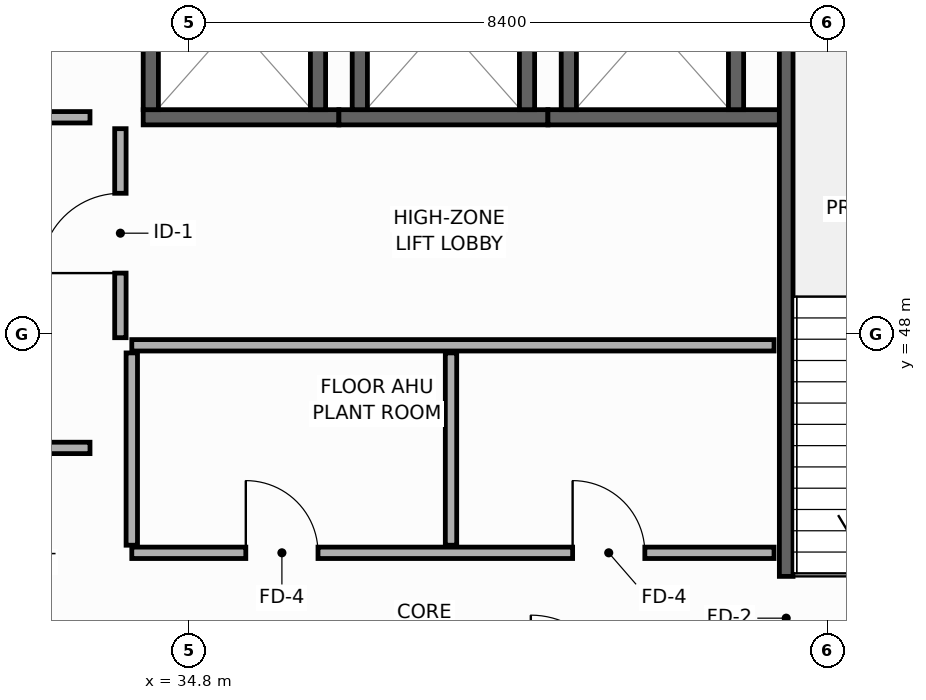
"""IFC4 building model, lengths in metres.
Left out: names, types, materials, properties, quantities, classifications, styles, units other than length and angle.
Written with IfcOpenShell. Run it as: python <this file> out.ifc"""

import sys

from ifc_helpers import new_model, si_unit, direction, frame, frame_2d, origin, place, context, subcontext, project, spatial, rectangle, extrude, element, fill, save


model = new_model("IFC4")
c1 = context("Model", 3, precision=1e-05, world=origin(), true_north=direction((0.0, 1.0)))
c2 = subcontext(c1, "Body", "Model", "MODEL_VIEW")
j1 = project(units=[si_unit("LENGTHUNIT", "METRE"), si_unit("PLANEANGLEUNIT", "RADIAN")], contexts=[c1])
p1 = place(None, origin())
s1 = spatial("IfcSite", under=j1, at=p1, CompositionType="ELEMENT")
p2 = place(p1, origin())
s2 = spatial("IfcBuilding", under=s1, at=p2, CompositionType="ELEMENT")
p3 = place(p2, frame((0.0, 0.0, 314.2)))
s3 = spatial("IfcBuildingStorey", under=s2, at=p3, CompositionType="ELEMENT", Elevation=314.2)
p4 = place(p3, frame((34.2, 50.85, 0.0), z_axis=(0.0, 0.0, 1.0), x_axis=(1.0, 0.0, 0.0)))
e1 = element("IfcWall", 1, at=p4, inside=s3, PredefinedType="SHEAR", context=c2, shape_type="SweptSolid", body=[
    extrude(rectangle(XDim=2.575, YDim=0.2, at=frame_2d((1.288, 0.0))), origin(), (0.0, 0.0, 1.0), 4.75),
])
for number, where, z_axis, x_axis in (
    (2, (34.3, 50.95, 0.0), (0.0, 0.0, 1.0), (0.0, 1.0, 0.0)),
    (3, (36.5, 50.95, 0.0), (0.0, 0.0, 1.0), (0.0, 1.0, 0.0)),
):
    element("IfcWall", number, at=place(p3, frame(where, z_axis=z_axis, x_axis=x_axis)), inside=s3, PredefinedType="SHEAR", context=c2, shape_type="SweptSolid", body=[
        extrude(rectangle(XDim=2.3, YDim=0.2, at=frame_2d((1.15, 0.0))), origin(), (0.0, 0.0, 1.0), 4.75),
    ])
p5 = place(p3, frame((36.775, 50.85, 0.0), z_axis=(0.0, 0.0, 1.0), x_axis=(1.0, 0.0, 0.0)))
e4 = element("IfcWall", 4, at=p5, inside=s3, PredefinedType="SHEAR", context=c2, shape_type="SweptSolid", body=[
    extrude(rectangle(XDim=2.75, YDim=0.2, at=frame_2d((1.375, 0.0))), origin(), (0.0, 0.0, 1.0), 4.75),
])
for number, where, z_axis, x_axis in (
    (5, (37.05, 50.95, 0.0), (0.0, 0.0, 1.0), (0.0, 1.0, 0.0)),
    (6, (39.25, 50.95, 0.0), (0.0, 0.0, 1.0), (0.0, 1.0, 0.0)),
):
    element("IfcWall", number, at=place(p3, frame(where, z_axis=z_axis, x_axis=x_axis)), inside=s3, PredefinedType="SHEAR", context=c2, shape_type="SweptSolid", body=[
        extrude(rectangle(XDim=2.3, YDim=0.2, at=frame_2d((1.15, 0.0))), origin(), (0.0, 0.0, 1.0), 4.75),
    ])
p6 = place(p3, frame((39.525, 50.85, 0.0), z_axis=(0.0, 0.0, 1.0), x_axis=(1.0, 0.0, 0.0)))
e7 = element("IfcWall", 7, at=p6, inside=s3, PredefinedType="SHEAR", context=c2, shape_type="SweptSolid", body=[
    extrude(rectangle(XDim=3.045, YDim=0.2, at=frame_2d((1.522, 0.0))), origin(), (0.0, 0.0, 1.0), 4.75),
])
for number, where, z_axis, x_axis in (
    (8, (39.8, 50.95, 0.0), (0.0, 0.0, 1.0), (0.0, 1.0, 0.0)),
    (9, (42.0, 50.95, 0.0), (0.0, 0.0, 1.0), (0.0, 1.0, 0.0)),
):
    element("IfcWall", number, at=place(p3, frame(where, z_axis=z_axis, x_axis=x_axis)), inside=s3, PredefinedType="SHEAR", context=c2, shape_type="SweptSolid", body=[
        extrude(rectangle(XDim=2.3, YDim=0.2, at=frame_2d((1.15, 0.0))), origin(), (0.0, 0.0, 1.0), 4.75),
    ])
p7 = place(p3, frame((42.66, 53.8, 0.0), z_axis=(0.0, 0.0, 1.0), x_axis=(0.0, -1.0, 0.0)))
e10 = element("IfcWall", 10, at=p7, inside=s3, PredefinedType="SHEAR", context=c2, shape_type="SweptSolid", body=[
    extrude(rectangle(XDim=10.4, YDim=0.18, at=frame_2d((5.2, 0.0))), origin(), (0.0, 0.0, 1.0), 4.75),
])
p8 = place(p7, frame((8.99, 0.0, 0.0)))
e11 = element("IfcOpeningElement", 11, at=p8, cuts=e10, PredefinedType="OPENING", context=c2, shape_type="SweptSolid", body=[
    extrude(rectangle(XDim=1.1, YDim=2.15, at=frame_2d((0.55, 1.075))), frame((0.0, 0.1, 0.0), z_axis=(0.0, -1.0, 0.0), x_axis=(1.0, 0.0, 0.0)), (0.0, 0.0, 1.0), 0.2),
])
p9 = place(p3, frame((33.9, 47.95, 0.0), z_axis=(0.0, 0.0, 1.0), x_axis=(0.0, 1.0, 0.0)))
e12 = element("IfcWall", 12, at=p9, inside=s3, PredefinedType="PARTITIONING", context=c2, shape_type="SweptSolid", body=[
    extrude(rectangle(XDim=2.75, YDim=0.15, at=frame_2d((1.375, 0.0))), origin(), (0.0, 0.0, 1.0), 4.75),
])
p10 = place(p9, frame((0.85, 0.0, 0.0)))
e13 = element("IfcOpeningElement", 13, at=p10, cuts=e12, PredefinedType="OPENING", context=c2, shape_type="SweptSolid", body=[
    extrude(rectangle(XDim=1.05, YDim=2.15, at=frame_2d((0.525, 1.075))), frame((0.0, 0.085, 0.0), z_axis=(0.0, -1.0, 0.0), x_axis=(1.0, 0.0, 0.0)), (0.0, 0.0, 1.0), 0.17),
])
p11 = place(p3, frame((34.05, 45.12, 0.0), z_axis=(0.0, 0.0, 1.0), x_axis=(1.0, 0.0, 0.0)))
e14 = element("IfcWall", 14, at=p11, inside=s3, PredefinedType="PARTITIONING", context=c2, shape_type="SweptSolid", body=[
    extrude(rectangle(XDim=8.45, YDim=0.15, at=frame_2d((4.225, 0.0))), origin(), (0.0, 0.0, 1.0), 4.75),
])
p12 = place(p11, frame((1.5, 0.0, 0.0)))
e15 = element("IfcOpeningElement", 15, at=p12, cuts=e14, PredefinedType="OPENING", context=c2, shape_type="SweptSolid", body=[
    extrude(rectangle(XDim=0.95, YDim=2.15, at=frame_2d((0.475, 1.075))), frame((0.0, 0.085, 0.0), z_axis=(0.0, -1.0, 0.0), x_axis=(1.0, 0.0, 0.0)), (0.0, 0.0, 1.0), 0.17),
])
p13 = place(p11, frame((5.8, 0.0, 0.0)))
e16 = element("IfcOpeningElement", 16, at=p13, cuts=e14, PredefinedType="OPENING", context=c2, shape_type="SweptSolid", body=[
    extrude(rectangle(XDim=0.95, YDim=2.15, at=frame_2d((0.475, 1.075))), frame((0.0, 0.085, 0.0), z_axis=(0.0, -1.0, 0.0), x_axis=(1.0, 0.0, 0.0)), (0.0, 0.0, 1.0), 0.17),
])
p14 = place(p3, frame((34.05, 47.85, 0.0), z_axis=(0.0, 0.0, 1.0), x_axis=(1.0, 0.0, 0.0)))
e17 = element("IfcWall", 17, at=p14, inside=s3, PredefinedType="PARTITIONING", context=c2, shape_type="SweptSolid", body=[
    extrude(rectangle(XDim=8.45, YDim=0.15, at=frame_2d((4.225, 0.0))), origin(), (0.0, 0.0, 1.0), 4.75),
])
for number, where, z_axis, x_axis in (
    (18, (38.25, 45.22, 0.0), (0.0, 0.0, 1.0), (0.0, 1.0, 0.0)),
    (19, (34.05, 45.22, 0.0), (0.0, 0.0, 1.0), (0.0, 1.0, 0.0)),
):
    element("IfcWall", number, at=place(p3, frame(where, z_axis=z_axis, x_axis=x_axis)), inside=s3, PredefinedType="PARTITIONING", context=c2, shape_type="SweptSolid", body=[
        extrude(rectangle(XDim=2.53, YDim=0.15, at=frame_2d((1.265, 0.0))), origin(), (0.0, 0.0, 1.0), 4.75),
    ])
p15 = place(p3, frame((25.85, 50.85, 0.0), z_axis=(0.0, 0.0, 1.0), x_axis=(1.0, 0.0, 0.0)))
e20 = element("IfcWall", 20, at=p15, inside=s3, PredefinedType="PARTITIONING", context=c2, shape_type="SweptSolid", body=[
    extrude(rectangle(XDim=7.65, YDim=0.15, at=frame_2d((3.825, 0.0))), origin(), (0.0, 0.0, 1.0), 4.75),
])
p16 = place(p15, frame((1.25, 0.0, 0.0)))
e21 = element("IfcOpeningElement", 21, at=p16, cuts=e20, PredefinedType="OPENING", context=c2, shape_type="SweptSolid", body=[
    extrude(rectangle(XDim=0.95, YDim=2.15, at=frame_2d((0.475, 1.075))), frame((0.0, 0.085, 0.0), z_axis=(0.0, -1.0, 0.0), x_axis=(1.0, 0.0, 0.0)), (0.0, 0.0, 1.0), 0.17),
])
p17 = place(p3, frame((25.85, 46.5, 0.0), z_axis=(0.0, 0.0, 1.0), x_axis=(1.0, 0.0, 0.0)))
e22 = element("IfcWall", 22, at=p17, inside=s3, PredefinedType="PARTITIONING", context=c2, shape_type="SweptSolid", body=[
    extrude(rectangle(XDim=7.65, YDim=0.15, at=frame_2d((3.825, 0.0))), origin(), (0.0, 0.0, 1.0), 4.75),
])
p18 = place(p17, frame((2.8, 0.0, 0.0)))
e23 = element("IfcOpeningElement", 23, at=p18, cuts=e22, PredefinedType="OPENING", context=c2, shape_type="SweptSolid", body=[
    extrude(rectangle(XDim=0.95, YDim=2.15, at=frame_2d((0.475, 1.075))), frame((0.0, 0.085, 0.0), z_axis=(0.0, -1.0, 0.0), x_axis=(1.0, 0.0, 0.0)), (0.0, 0.0, 1.0), 0.17),
])
p19 = place(p8, origin())
e24 = element("IfcDoor", 24, at=p19, inside=s3, OperationType="SINGLE_SWING_LEFT", PredefinedType="DOOR", context=c2, shape_type="SweptSolid", body=[
    extrude(rectangle(XDim=1.1, YDim=2.15, at=frame_2d((0.55, 1.075))), frame((0.0, 0.025, 0.0), z_axis=(0.0, -1.0, 0.0), x_axis=(1.0, 0.0, 0.0)), (0.0, 0.0, 1.0), 0.05),
])
fill(e11, e24)
p20 = place(p10, origin())
e25 = element("IfcDoor", 25, at=p20, inside=s3, OperationType="SINGLE_SWING_LEFT", PredefinedType="DOOR", context=c2, shape_type="SweptSolid", body=[
    extrude(rectangle(XDim=1.05, YDim=2.15, at=frame_2d((0.525, 1.075))), frame((0.0, 0.025, 0.0), z_axis=(0.0, -1.0, 0.0), x_axis=(1.0, 0.0, 0.0)), (0.0, 0.0, 1.0), 0.05),
])
fill(e13, e25)
p21 = place(p12, origin())
e26 = element("IfcDoor", 26, at=p21, inside=s3, OperationType="SINGLE_SWING_LEFT", PredefinedType="DOOR", context=c2, shape_type="SweptSolid", body=[
    extrude(rectangle(XDim=0.95, YDim=2.15, at=frame_2d((0.475, 1.075))), frame((0.0, 0.025, 0.0), z_axis=(0.0, -1.0, 0.0), x_axis=(1.0, 0.0, 0.0)), (0.0, 0.0, 1.0), 0.05),
])
fill(e15, e26)
p22 = place(p13, origin())
e27 = element("IfcDoor", 27, at=p22, inside=s3, OperationType="SINGLE_SWING_LEFT", PredefinedType="DOOR", context=c2, shape_type="SweptSolid", body=[
    extrude(rectangle(XDim=0.95, YDim=2.15, at=frame_2d((0.475, 1.075))), frame((0.0, 0.025, 0.0), z_axis=(0.0, -1.0, 0.0), x_axis=(1.0, 0.0, 0.0)), (0.0, 0.0, 1.0), 0.05),
])
fill(e16, e27)
save(model, sys.argv[1])
